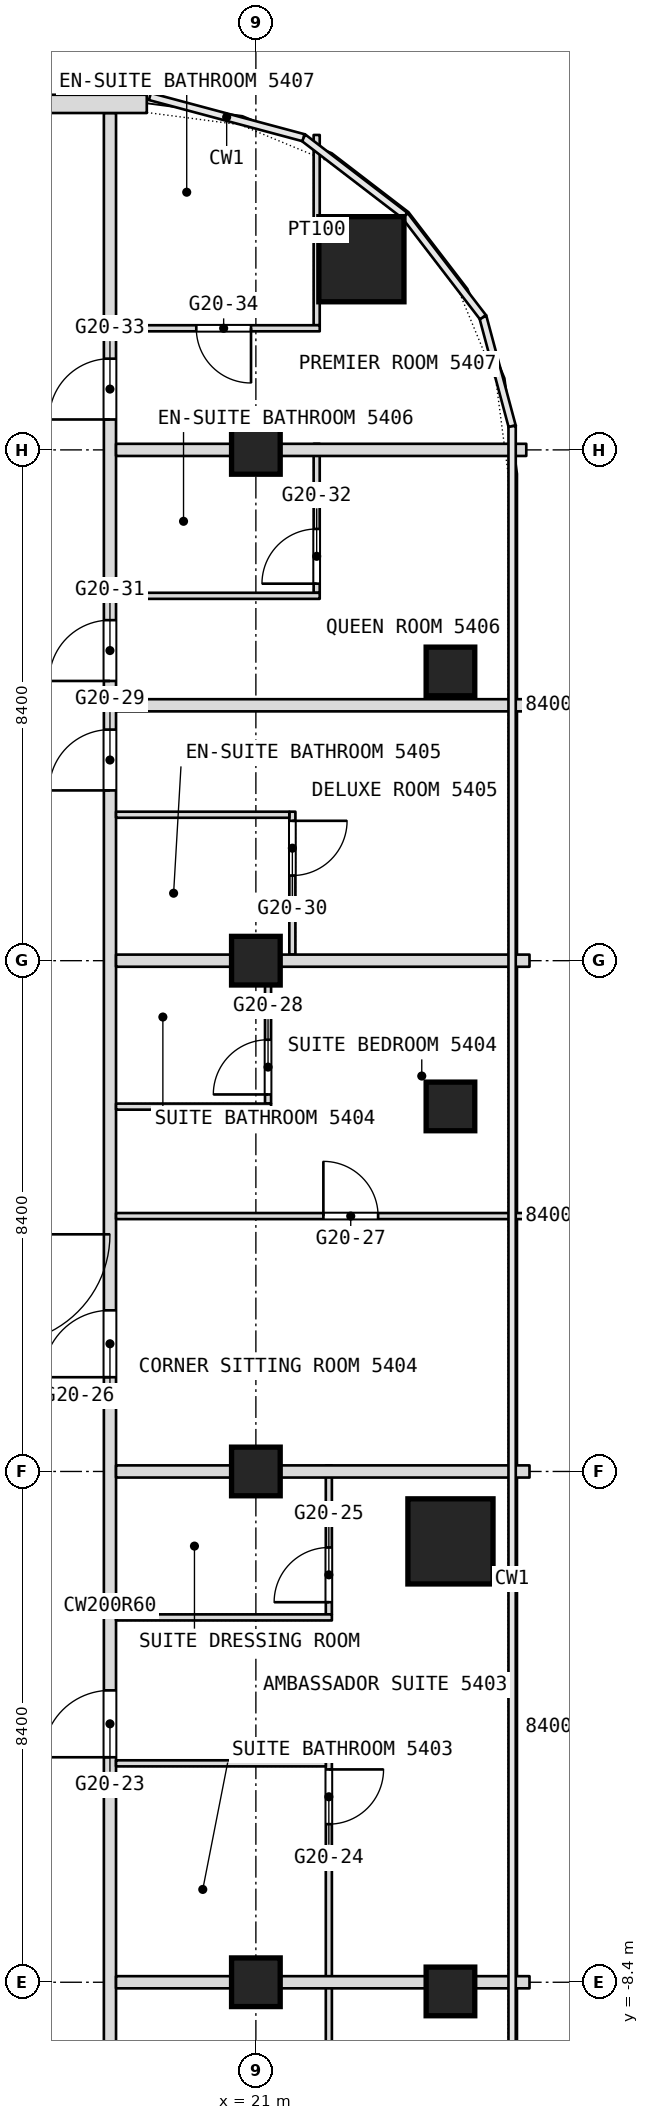
"""IFC4 building model, lengths in metres.
Left out: names, types, materials, properties, quantities, classifications, styles, units other than length and angle.
Written with IfcOpenShell. Run it as: python <this file> out.ifc"""

import sys

from ifc_helpers import new_model, si_unit, direction, frame, frame_2d, origin, origin_2d, place, context, subcontext, project, spatial, rectangle, extrude, element, fill, save


model = new_model("IFC4")
c1 = context("Model", 3, precision=1e-05, world=origin(), true_north=direction((0.0, 1.0)))
c2 = subcontext(c1, "Body", "Model", "MODEL_VIEW")
j1 = project(units=[si_unit("LENGTHUNIT", "METRE"), si_unit("PLANEANGLEUNIT", "RADIAN")], contexts=[c1])
p1 = place(None, origin())
s1 = spatial("IfcSite", under=j1, at=p1, CompositionType="ELEMENT")
p2 = place(p1, origin())
s2 = spatial("IfcBuilding", under=s1, at=p2, CompositionType="ELEMENT")
p3 = place(p2, frame((0.0, 0.0, 230.9)))
s3 = spatial("IfcBuildingStorey", under=s2, at=p3, CompositionType="ELEMENT", Elevation=230.9)
for number, where, z_axis, x_axis in (
    (1, (24.2, -1.15, 0.0), (0.0, 0.0, 1.0), (1.0, 0.0, 0.0)),
    (2, (22.736, 19.936, 0.0), (0.0, 0.0, 1.0), (1.0, 0.0, 0.0)),
):
    element("IfcColumn", number, at=place(p3, frame(where, z_axis=z_axis, x_axis=x_axis)), inside=s3, PredefinedType="COLUMN", context=c2, shape_type="SweptSolid", body=[
        extrude(rectangle(XDim=1.4, YDim=1.4, at=origin_2d()), origin(), (0.0, 0.0, 1.0), 3.6),
    ])
for number, where, z_axis, x_axis in (
    (3, (21.0, -8.4, 0.0), (0.0, 0.0, 1.0), (1.0, 0.0, 0.0)),
    (4, (21.0, 0.0, 0.0), (0.0, 0.0, 1.0), (1.0, 0.0, 0.0)),
    (5, (21.0, 8.4, 0.0), (0.0, 0.0, 1.0), (1.0, 0.0, 0.0)),
    (6, (21.0, 16.8, 0.0), (0.0, 0.0, 1.0), (1.0, 0.0, 0.0)),
    (7, (24.2, 13.156, 0.0), (0.0, 0.0, 1.0), (1.0, 0.0, 0.0)),
    (8, (24.2, 6.003, 0.0), (0.0, 0.0, 1.0), (1.0, 0.0, 0.0)),
    (9, (24.2, -8.551, 0.0), (0.0, 0.0, 1.0), (1.0, 0.0, 0.0)),
):
    element("IfcColumn", number, at=place(p3, frame(where, z_axis=z_axis, x_axis=x_axis)), inside=s3, PredefinedType="COLUMN", context=c2, shape_type="SweptSolid", body=[
        extrude(rectangle(XDim=0.8, YDim=0.8, at=origin_2d()), origin(), (0.0, 0.0, 1.0), 3.6),
    ])
p4 = place(p3, frame((22.2, -11.95, 0.0), z_axis=(0.0, 0.0, 1.0), x_axis=(0.0, 1.0, 0.0)))
e10 = element("IfcWall", 10, at=p4, inside=s3, PredefinedType="PARTITIONING", context=c2, shape_type="SweptSolid", body=[
    extrude(rectangle(XDim=7.2, YDim=0.1, at=frame_2d((3.6, 0.0))), origin(), (0.0, 0.0, 1.0), 3.34),
])
p5 = place(p4, frame((0.15, 0.0, 0.0)))
e11 = element("IfcOpeningElement", 11, at=p5, cuts=e10, PredefinedType="OPENING", context=c2, shape_type="SweptSolid", body=[
    extrude(rectangle(XDim=0.9, YDim=2.1, at=frame_2d((0.45, 1.05))), frame((0.0, 0.05, 0.0), z_axis=(0.0, -1.0, 0.0), x_axis=(1.0, 0.0, 0.0)), (0.0, 0.0, 1.0), 0.1),
])
p6 = place(p4, frame((6.15, 0.0, 0.0)))
e12 = element("IfcOpeningElement", 12, at=p6, cuts=e10, PredefinedType="OPENING", context=c2, shape_type="SweptSolid", body=[
    extrude(rectangle(XDim=0.9, YDim=2.1, at=frame_2d((0.45, 1.05))), frame((0.0, 0.05, 0.0), z_axis=(0.0, -1.0, 0.0), x_axis=(1.0, 0.0, 0.0)), (0.0, 0.0, 1.0), 0.1),
])
p7 = place(p3, frame((22.2, -2.35, 0.0), z_axis=(0.0, 0.0, 1.0), x_axis=(0.0, 1.0, 0.0)))
e13 = element("IfcWall", 13, at=p7, inside=s3, PredefinedType="PARTITIONING", context=c2, shape_type="SweptSolid", body=[
    extrude(rectangle(XDim=2.45, YDim=0.1, at=frame_2d((1.225, 0.0))), origin(), (0.0, 0.0, 1.0), 3.34),
])
p8 = place(p7, frame((0.2, 0.0, 0.0)))
e14 = element("IfcOpeningElement", 14, at=p8, cuts=e13, PredefinedType="OPENING", context=c2, shape_type="SweptSolid", body=[
    extrude(rectangle(XDim=0.9, YDim=2.1, at=frame_2d((0.45, 1.05))), frame((0.0, 0.05, 0.0), z_axis=(0.0, -1.0, 0.0), x_axis=(1.0, 0.0, 0.0)), (0.0, 0.0, 1.0), 0.1),
])
p9 = place(p3, frame((22.0, 14.45, 0.0), z_axis=(0.0, 0.0, 1.0), x_axis=(0.0, 1.0, 0.0)))
e15 = element("IfcWall", 15, at=p9, inside=s3, PredefinedType="PARTITIONING", context=c2, shape_type="SweptSolid", body=[
    extrude(rectangle(XDim=2.45, YDim=0.1, at=frame_2d((1.225, 0.0))), origin(), (0.0, 0.0, 1.0), 3.34),
])
p10 = place(p9, frame((0.15, 0.0, 0.0)))
e16 = element("IfcOpeningElement", 16, at=p10, cuts=e15, PredefinedType="OPENING", context=c2, shape_type="SweptSolid", body=[
    extrude(rectangle(XDim=0.9, YDim=2.1, at=frame_2d((0.45, 1.05))), frame((0.0, 0.05, 0.0), z_axis=(0.0, -1.0, 0.0), x_axis=(1.0, 0.0, 0.0)), (0.0, 0.0, 1.0), 0.1),
])
p11 = place(p3, frame((22.0, 18.85, 0.0), z_axis=(0.0, 0.0, 1.0), x_axis=(0.0, 1.0, 0.0)))
e17 = element("IfcWall", 17, at=p11, inside=s3, PredefinedType="PARTITIONING", context=c2, shape_type="SweptSolid", body=[
    extrude(rectangle(XDim=3.129, YDim=0.1, at=frame_2d((1.564, 0.0))), origin(), (0.0, 0.0, 1.0), 3.34),
])
p12 = place(p3, frame((21.6, 8.5, 0.0), z_axis=(0.0, 0.0, 1.0), x_axis=(0.0, 1.0, 0.0)))
e18 = element("IfcWall", 18, at=p12, inside=s3, PredefinedType="PARTITIONING", context=c2, shape_type="SweptSolid", body=[
    extrude(rectangle(XDim=2.35, YDim=0.1, at=frame_2d((1.175, 0.0))), origin(), (0.0, 0.0, 1.0), 3.34),
])
p13 = place(p12, frame((1.3, 0.0, 0.0)))
e19 = element("IfcOpeningElement", 19, at=p13, cuts=e18, PredefinedType="OPENING", context=c2, shape_type="SweptSolid", body=[
    extrude(rectangle(XDim=0.9, YDim=2.1, at=frame_2d((0.45, 1.05))), frame((0.0, 0.05, 0.0), z_axis=(0.0, -1.0, 0.0), x_axis=(1.0, 0.0, 0.0)), (0.0, 0.0, 1.0), 0.1),
])
p14 = place(p3, frame((21.2, 6.05, 0.0), z_axis=(0.0, 0.0, 1.0), x_axis=(0.0, 1.0, 0.0)))
e20 = element("IfcWall", 20, at=p14, inside=s3, PredefinedType="PARTITIONING", context=c2, shape_type="SweptSolid", body=[
    extrude(rectangle(XDim=2.45, YDim=0.1, at=frame_2d((1.225, 0.0))), origin(), (0.0, 0.0, 1.0), 3.34),
])
p15 = place(p14, frame((0.15, 0.0, 0.0)))
e21 = element("IfcOpeningElement", 21, at=p15, cuts=e20, PredefinedType="OPENING", context=c2, shape_type="SweptSolid", body=[
    extrude(rectangle(XDim=0.9, YDim=2.1, at=frame_2d((0.45, 1.05))), frame((0.0, 0.05, 0.0), z_axis=(0.0, -1.0, 0.0), x_axis=(1.0, 0.0, 0.0)), (0.0, 0.0, 1.0), 0.1),
])
p16 = place(p3, frame((18.6, -26.751, 0.0), z_axis=(0.0, 0.0, 1.0), x_axis=(0.0, 1.0, 0.0)))
e22 = element("IfcWall", 22, at=p16, inside=s3, PredefinedType="PARTITIONING", context=c2, shape_type="SweptSolid", body=[
    extrude(rectangle(XDim=49.091, YDim=0.2, at=frame_2d((24.545, 0.0))), origin(), (0.0, 0.0, 1.0), 3.34),
])
p17 = place(p16, frame((6.988, 0.0, 0.0)))
e23 = element("IfcOpeningElement", 23, at=p17, cuts=e22, PredefinedType="OPENING", context=c2, shape_type="SweptSolid", body=[
    extrude(rectangle(XDim=1.1, YDim=2.1, at=frame_2d((0.55, 1.05))), frame((0.0, 0.1, 0.0), z_axis=(0.0, -1.0, 0.0), x_axis=(1.0, 0.0, 0.0)), (0.0, 0.0, 1.0), 0.2),
])
p18 = place(p16, frame((13.551, 0.0, 0.0)))
e24 = element("IfcOpeningElement", 24, at=p18, cuts=e22, PredefinedType="OPENING", context=c2, shape_type="SweptSolid", body=[
    extrude(rectangle(XDim=1.1, YDim=2.1, at=frame_2d((0.55, 1.05))), frame((0.0, 0.1, 0.0), z_axis=(0.0, -1.0, 0.0), x_axis=(1.0, 0.0, 0.0)), (0.0, 0.0, 1.0), 0.2),
])
p19 = place(p16, frame((22.051, 0.0, 0.0)))
e25 = element("IfcOpeningElement", 25, at=p19, cuts=e22, PredefinedType="OPENING", context=c2, shape_type="SweptSolid", body=[
    extrude(rectangle(XDim=1.1, YDim=2.1, at=frame_2d((0.55, 1.05))), frame((0.0, 0.1, 0.0), z_axis=(0.0, -1.0, 0.0), x_axis=(1.0, 0.0, 0.0)), (0.0, 0.0, 1.0), 0.2),
])
p20 = place(p16, frame((28.301, 0.0, 0.0)))
e26 = element("IfcOpeningElement", 26, at=p20, cuts=e22, PredefinedType="OPENING", context=c2, shape_type="SweptSolid", body=[
    extrude(rectangle(XDim=1.1, YDim=2.1, at=frame_2d((0.55, 1.05))), frame((0.0, 0.1, 0.0), z_axis=(0.0, -1.0, 0.0), x_axis=(1.0, 0.0, 0.0)), (0.0, 0.0, 1.0), 0.2),
])
p21 = place(p16, frame((37.951, 0.0, 0.0)))
e27 = element("IfcOpeningElement", 27, at=p21, cuts=e22, PredefinedType="OPENING", context=c2, shape_type="SweptSolid", body=[
    extrude(rectangle(XDim=1.0, YDim=2.1, at=frame_2d((0.5, 1.05))), frame((0.0, 0.1, 0.0), z_axis=(0.0, -1.0, 0.0), x_axis=(1.0, 0.0, 0.0)), (0.0, 0.0, 1.0), 0.2),
])
p22 = place(p16, frame((39.751, 0.0, 0.0)))
e28 = element("IfcOpeningElement", 28, at=p22, cuts=e22, PredefinedType="OPENING", context=c2, shape_type="SweptSolid", body=[
    extrude(rectangle(XDim=1.0, YDim=2.1, at=frame_2d((0.5, 1.05))), frame((0.0, 0.1, 0.0), z_axis=(0.0, -1.0, 0.0), x_axis=(1.0, 0.0, 0.0)), (0.0, 0.0, 1.0), 0.2),
])
p23 = place(p16, frame((44.051, 0.0, 0.0)))
e29 = element("IfcOpeningElement", 29, at=p23, cuts=e22, PredefinedType="OPENING", context=c2, shape_type="SweptSolid", body=[
    extrude(rectangle(XDim=1.0, YDim=2.1, at=frame_2d((0.5, 1.05))), frame((0.0, 0.1, 0.0), z_axis=(0.0, -1.0, 0.0), x_axis=(1.0, 0.0, 0.0)), (0.0, 0.0, 1.0), 0.2),
])
p24 = place(p3, frame((18.7, -8.4, 0.0), z_axis=(0.0, 0.0, 1.0), x_axis=(1.0, 0.0, 0.0)))
e30 = element("IfcWall", 30, at=p24, inside=s3, PredefinedType="PARTITIONING", context=c2, shape_type="SweptSolid", body=[
    extrude(rectangle(XDim=6.8, YDim=0.2, at=frame_2d((3.4, 0.0))), origin(), (0.0, 0.0, 1.0), 2.94),
])
p25 = place(p3, frame((18.7, -4.8, 0.0), z_axis=(0.0, 0.0, 1.0), x_axis=(1.0, 0.0, 0.0)))
e31 = element("IfcWall", 31, at=p25, inside=s3, PredefinedType="PARTITIONING", context=c2, shape_type="SweptSolid", body=[
    extrude(rectangle(XDim=3.45, YDim=0.1, at=frame_2d((1.725, 0.0))), origin(), (0.0, 0.0, 1.0), 3.34),
])
p26 = place(p3, frame((18.7, -2.4, 0.0), z_axis=(0.0, 0.0, 1.0), x_axis=(1.0, 0.0, 0.0)))
e32 = element("IfcWall", 32, at=p26, inside=s3, PredefinedType="PARTITIONING", context=c2, shape_type="SweptSolid", body=[
    extrude(rectangle(XDim=3.55, YDim=0.1, at=frame_2d((1.775, 0.0))), origin(), (0.0, 0.0, 1.0), 3.34),
])
p27 = place(p3, frame((18.7, 0.0, 0.0), z_axis=(0.0, 0.0, 1.0), x_axis=(1.0, 0.0, 0.0)))
e33 = element("IfcWall", 33, at=p27, inside=s3, PredefinedType="PARTITIONING", context=c2, shape_type="SweptSolid", body=[
    extrude(rectangle(XDim=6.8, YDim=0.2, at=frame_2d((3.4, 0.0))), origin(), (0.0, 0.0, 1.0), 2.94),
])
p28 = place(p3, frame((18.7, 4.2, 0.0), z_axis=(0.0, 0.0, 1.0), x_axis=(1.0, 0.0, 0.0)))
e34 = element("IfcWall", 34, at=p28, inside=s3, PredefinedType="PARTITIONING", context=c2, shape_type="SweptSolid", body=[
    extrude(rectangle(XDim=6.8, YDim=0.1, at=frame_2d((3.4, 0.0))), origin(), (0.0, 0.0, 1.0), 3.34),
])
p29 = place(p28, frame((3.41, 0.0, 0.0)))
e35 = element("IfcOpeningElement", 35, at=p29, cuts=e34, PredefinedType="OPENING", context=c2, shape_type="SweptSolid", body=[
    extrude(rectangle(XDim=0.9, YDim=2.1, at=frame_2d((0.45, 1.05))), frame((0.0, 0.05, 0.0), z_axis=(0.0, -1.0, 0.0), x_axis=(1.0, 0.0, 0.0)), (0.0, 0.0, 1.0), 0.1),
])
p30 = place(p3, frame((18.7, 6.0, 0.0), z_axis=(0.0, 0.0, 1.0), x_axis=(1.0, 0.0, 0.0)))
e36 = element("IfcWall", 36, at=p30, inside=s3, PredefinedType="PARTITIONING", context=c2, shape_type="SweptSolid", body=[
    extrude(rectangle(XDim=2.55, YDim=0.1, at=frame_2d((1.275, 0.0))), origin(), (0.0, 0.0, 1.0), 3.34),
])
p31 = place(p3, frame((18.7, 8.4, 0.0), z_axis=(0.0, 0.0, 1.0), x_axis=(1.0, 0.0, 0.0)))
e37 = element("IfcWall", 37, at=p31, inside=s3, PredefinedType="PARTITIONING", context=c2, shape_type="SweptSolid", body=[
    extrude(rectangle(XDim=6.8, YDim=0.2, at=frame_2d((3.4, 0.0))), origin(), (0.0, 0.0, 1.0), 2.94),
])
p32 = place(p3, frame((18.7, 10.8, 0.0), z_axis=(0.0, 0.0, 1.0), x_axis=(1.0, 0.0, 0.0)))
e38 = element("IfcWall", 38, at=p32, inside=s3, PredefinedType="PARTITIONING", context=c2, shape_type="SweptSolid", body=[
    extrude(rectangle(XDim=2.85, YDim=0.1, at=frame_2d((1.425, 0.0))), origin(), (0.0, 0.0, 1.0), 3.34),
])
p33 = place(p3, frame((18.7, 12.6, 0.0), z_axis=(0.0, 0.0, 1.0), x_axis=(1.0, 0.0, 0.0)))
e39 = element("IfcWall", 39, at=p33, inside=s3, PredefinedType="PARTITIONING", context=c2, shape_type="SweptSolid", body=[
    extrude(rectangle(XDim=6.8, YDim=0.2, at=frame_2d((3.4, 0.0))), origin(), (0.0, 0.0, 1.0), 3.34),
])
p34 = place(p3, frame((18.7, 14.4, 0.0), z_axis=(0.0, 0.0, 1.0), x_axis=(1.0, 0.0, 0.0)))
e40 = element("IfcWall", 40, at=p34, inside=s3, PredefinedType="PARTITIONING", context=c2, shape_type="SweptSolid", body=[
    extrude(rectangle(XDim=3.35, YDim=0.1, at=frame_2d((1.675, 0.0))), origin(), (0.0, 0.0, 1.0), 3.34),
])
p35 = place(p3, frame((18.7, 16.8, 0.0), z_axis=(0.0, 0.0, 1.0), x_axis=(1.0, 0.0, 0.0)))
e41 = element("IfcWall", 41, at=p35, inside=s3, PredefinedType="PARTITIONING", context=c2, shape_type="SweptSolid", body=[
    extrude(rectangle(XDim=6.747, YDim=0.2, at=frame_2d((3.374, 0.0))), origin(), (0.0, 0.0, 1.0), 2.94),
])
p36 = place(p3, frame((18.7, 18.8, 0.0), z_axis=(0.0, 0.0, 1.0), x_axis=(1.0, 0.0, 0.0)))
e42 = element("IfcWall", 42, at=p36, inside=s3, PredefinedType="PARTITIONING", context=c2, shape_type="SweptSolid", body=[
    extrude(rectangle(XDim=3.35, YDim=0.1, at=frame_2d((1.675, 0.0))), origin(), (0.0, 0.0, 1.0), 3.34),
])
p37 = place(p36, frame((1.32, 0.0, 0.0)))
e43 = element("IfcOpeningElement", 43, at=p37, cuts=e42, PredefinedType="OPENING", context=c2, shape_type="SweptSolid", body=[
    extrude(rectangle(XDim=0.9, YDim=2.1, at=frame_2d((0.45, 1.05))), frame((0.0, 0.05, 0.0), z_axis=(0.0, -1.0, 0.0), x_axis=(1.0, 0.0, 0.0)), (0.0, 0.0, 1.0), 0.1),
])
p38 = place(p3, frame((19.206, 22.49, 0.0), z_axis=(0.0, 0.0, 1.0), x_axis=(-1.0, 0.0, 0.0)))
e44 = element("IfcWall", 44, at=p38, inside=s3, PredefinedType="NOTDEFINED", context=c2, shape_type="SweptSolid", body=[
    extrude(rectangle(XDim=38.412, YDim=0.3, at=frame_2d((19.206, 0.0))), origin(), (0.0, 0.0, 1.0), 3.6),
])
p39 = place(p38, frame((3.306, 0.0, 0.9)))
e45 = element("IfcOpeningElement", 45, at=p39, cuts=e44, PredefinedType="OPENING", context=c2, shape_type="SweptSolid", body=[
    extrude(rectangle(XDim=2.4, YDim=2.1, at=frame_2d((1.2, 1.05))), frame((0.0, 0.15, 0.0), z_axis=(0.0, -1.0, 0.0), x_axis=(1.0, 0.0, 0.0)), (0.0, 0.0, 1.0), 0.3),
])
p40 = place(p38, frame((7.506, 0.0, 0.9)))
e46 = element("IfcOpeningElement", 46, at=p40, cuts=e44, PredefinedType="OPENING", context=c2, shape_type="SweptSolid", body=[
    extrude(rectangle(XDim=2.4, YDim=2.1, at=frame_2d((1.2, 1.05))), frame((0.0, 0.15, 0.0), z_axis=(0.0, -1.0, 0.0), x_axis=(1.0, 0.0, 0.0)), (0.0, 0.0, 1.0), 0.3),
])
p41 = place(p38, frame((11.706, 0.0, 0.9)))
e47 = element("IfcOpeningElement", 47, at=p41, cuts=e44, PredefinedType="OPENING", context=c2, shape_type="SweptSolid", body=[
    extrude(rectangle(XDim=2.4, YDim=2.1, at=frame_2d((1.2, 1.05))), frame((0.0, 0.15, 0.0), z_axis=(0.0, -1.0, 0.0), x_axis=(1.0, 0.0, 0.0)), (0.0, 0.0, 1.0), 0.3),
])
p42 = place(p38, frame((15.906, 0.0, 0.9)))
e48 = element("IfcOpeningElement", 48, at=p42, cuts=e44, PredefinedType="OPENING", context=c2, shape_type="SweptSolid", body=[
    extrude(rectangle(XDim=2.4, YDim=2.1, at=frame_2d((1.2, 1.05))), frame((0.0, 0.15, 0.0), z_axis=(0.0, -1.0, 0.0), x_axis=(1.0, 0.0, 0.0)), (0.0, 0.0, 1.0), 0.3),
])
p43 = place(p38, frame((20.106, 0.0, 0.9)))
e49 = element("IfcOpeningElement", 49, at=p43, cuts=e44, PredefinedType="OPENING", context=c2, shape_type="SweptSolid", body=[
    extrude(rectangle(XDim=2.4, YDim=2.1, at=frame_2d((1.2, 1.05))), frame((0.0, 0.15, 0.0), z_axis=(0.0, -1.0, 0.0), x_axis=(1.0, 0.0, 0.0)), (0.0, 0.0, 1.0), 0.3),
])
p44 = place(p38, frame((24.306, 0.0, 0.9)))
e50 = element("IfcOpeningElement", 50, at=p44, cuts=e44, PredefinedType="OPENING", context=c2, shape_type="SweptSolid", body=[
    extrude(rectangle(XDim=2.4, YDim=2.1, at=frame_2d((1.2, 1.05))), frame((0.0, 0.15, 0.0), z_axis=(0.0, -1.0, 0.0), x_axis=(1.0, 0.0, 0.0)), (0.0, 0.0, 1.0), 0.3),
])
p45 = place(p38, frame((28.506, 0.0, 0.9)))
e51 = element("IfcOpeningElement", 51, at=p45, cuts=e44, PredefinedType="OPENING", context=c2, shape_type="SweptSolid", body=[
    extrude(rectangle(XDim=2.4, YDim=2.1, at=frame_2d((1.2, 1.05))), frame((0.0, 0.15, 0.0), z_axis=(0.0, -1.0, 0.0), x_axis=(1.0, 0.0, 0.0)), (0.0, 0.0, 1.0), 0.3),
])
p46 = place(p38, frame((32.706, 0.0, 0.9)))
e52 = element("IfcOpeningElement", 52, at=p46, cuts=e44, PredefinedType="OPENING", context=c2, shape_type="SweptSolid", body=[
    extrude(rectangle(XDim=2.4, YDim=2.1, at=frame_2d((1.2, 1.05))), frame((0.0, 0.15, 0.0), z_axis=(0.0, -1.0, 0.0), x_axis=(1.0, 0.0, 0.0)), (0.0, 0.0, 1.0), 0.3),
])
p47 = place(p6, origin())
e53 = element("IfcDoor", 53, at=p47, inside=s3, OperationType="SINGLE_SWING_RIGHT", PredefinedType="DOOR", context=c2, shape_type="SweptSolid", body=[
    extrude(rectangle(XDim=0.9, YDim=2.1, at=frame_2d((0.45, 1.05))), frame((0.0, 0.025, 0.0), z_axis=(0.0, -1.0, 0.0), x_axis=(1.0, 0.0, 0.0)), (0.0, 0.0, 1.0), 0.05),
])
fill(e12, e53)
p48 = place(p8, origin())
e54 = element("IfcDoor", 54, at=p48, inside=s3, OperationType="SINGLE_SWING_LEFT", PredefinedType="DOOR", context=c2, shape_type="SweptSolid", body=[
    extrude(rectangle(XDim=0.9, YDim=2.1, at=frame_2d((0.45, 1.05))), frame((0.0, 0.025, 0.0), z_axis=(0.0, -1.0, 0.0), x_axis=(1.0, 0.0, 0.0)), (0.0, 0.0, 1.0), 0.05),
])
fill(e14, e54)
p49 = place(p10, origin())
e55 = element("IfcDoor", 55, at=p49, inside=s3, OperationType="SINGLE_SWING_LEFT", PredefinedType="DOOR", context=c2, shape_type="SweptSolid", body=[
    extrude(rectangle(XDim=0.9, YDim=2.1, at=frame_2d((0.45, 1.05))), frame((0.0, 0.025, 0.0), z_axis=(0.0, -1.0, 0.0), x_axis=(1.0, 0.0, 0.0)), (0.0, 0.0, 1.0), 0.05),
])
fill(e16, e55)
p50 = place(p13, origin())
e56 = element("IfcDoor", 56, at=p50, inside=s3, OperationType="SINGLE_SWING_RIGHT", PredefinedType="DOOR", context=c2, shape_type="SweptSolid", body=[
    extrude(rectangle(XDim=0.9, YDim=2.1, at=frame_2d((0.45, 1.05))), frame((0.0, 0.025, 0.0), z_axis=(0.0, -1.0, 0.0), x_axis=(1.0, 0.0, 0.0)), (0.0, 0.0, 1.0), 0.05),
])
fill(e19, e56)
p51 = place(p15, origin())
e57 = element("IfcDoor", 57, at=p51, inside=s3, OperationType="SINGLE_SWING_LEFT", PredefinedType="DOOR", context=c2, shape_type="SweptSolid", body=[
    extrude(rectangle(XDim=0.9, YDim=2.1, at=frame_2d((0.45, 1.05))), frame((0.0, 0.025, 0.0), z_axis=(0.0, -1.0, 0.0), x_axis=(1.0, 0.0, 0.0)), (0.0, 0.0, 1.0), 0.05),
])
fill(e21, e57)
p52 = place(p19, origin())
e58 = element("IfcDoor", 58, at=p52, inside=s3, OperationType="SINGLE_SWING_RIGHT", PredefinedType="DOOR", context=c2, shape_type="SweptSolid", body=[
    extrude(rectangle(XDim=1.1, YDim=2.1, at=frame_2d((0.55, 1.05))), frame((0.0, 0.025, 0.0), z_axis=(0.0, -1.0, 0.0), x_axis=(1.0, 0.0, 0.0)), (0.0, 0.0, 1.0), 0.05),
])
fill(e25, e58)
p53 = place(p20, origin())
e59 = element("IfcDoor", 59, at=p53, inside=s3, OperationType="SINGLE_SWING_RIGHT", PredefinedType="DOOR", context=c2, shape_type="SweptSolid", body=[
    extrude(rectangle(XDim=1.1, YDim=2.1, at=frame_2d((0.55, 1.05))), frame((0.0, 0.025, 0.0), z_axis=(0.0, -1.0, 0.0), x_axis=(1.0, 0.0, 0.0)), (0.0, 0.0, 1.0), 0.05),
])
fill(e26, e59)
p54 = place(p21, origin())
e60 = element("IfcDoor", 60, at=p54, inside=s3, OperationType="SINGLE_SWING_LEFT", PredefinedType="DOOR", context=c2, shape_type="SweptSolid", body=[
    extrude(rectangle(XDim=1.0, YDim=2.1, at=frame_2d((0.5, 1.05))), frame((0.0, 0.025, 0.0), z_axis=(0.0, -1.0, 0.0), x_axis=(1.0, 0.0, 0.0)), (0.0, 0.0, 1.0), 0.05),
])
fill(e27, e60)
p55 = place(p22, origin())
e61 = element("IfcDoor", 61, at=p55, inside=s3, OperationType="SINGLE_SWING_LEFT", PredefinedType="DOOR", context=c2, shape_type="SweptSolid", body=[
    extrude(rectangle(XDim=1.0, YDim=2.1, at=frame_2d((0.5, 1.05))), frame((0.0, 0.025, 0.0), z_axis=(0.0, -1.0, 0.0), x_axis=(1.0, 0.0, 0.0)), (0.0, 0.0, 1.0), 0.05),
])
fill(e28, e61)
p56 = place(p23, origin())
e62 = element("IfcDoor", 62, at=p56, inside=s3, OperationType="SINGLE_SWING_LEFT", PredefinedType="DOOR", context=c2, shape_type="SweptSolid", body=[
    extrude(rectangle(XDim=1.0, YDim=2.1, at=frame_2d((0.5, 1.05))), frame((0.0, 0.025, 0.0), z_axis=(0.0, -1.0, 0.0), x_axis=(1.0, 0.0, 0.0)), (0.0, 0.0, 1.0), 0.05),
])
fill(e29, e62)
p57 = place(p29, origin())
e63 = element("IfcDoor", 63, at=p57, inside=s3, OperationType="SINGLE_SWING_RIGHT", PredefinedType="DOOR", context=c2, shape_type="SweptSolid", body=[
    extrude(rectangle(XDim=0.9, YDim=2.1, at=frame_2d((0.45, 1.05))), frame((0.0, 0.025, 0.0), z_axis=(0.0, -1.0, 0.0), x_axis=(1.0, 0.0, 0.0)), (0.0, 0.0, 1.0), 0.05),
])
fill(e35, e63)
p58 = place(p37, origin())
e64 = element("IfcDoor", 64, at=p58, inside=s3, OperationType="SINGLE_SWING_RIGHT", PredefinedType="DOOR", context=c2, shape_type="SweptSolid", body=[
    extrude(rectangle(XDim=0.9, YDim=2.1, at=frame_2d((0.45, 1.05))), frame((0.0, 0.025, 0.0), z_axis=(0.0, -1.0, 0.0), x_axis=(1.0, 0.0, 0.0)), (0.0, 0.0, 1.0), 0.05),
])
fill(e43, e64)
save(model, sys.argv[1])
